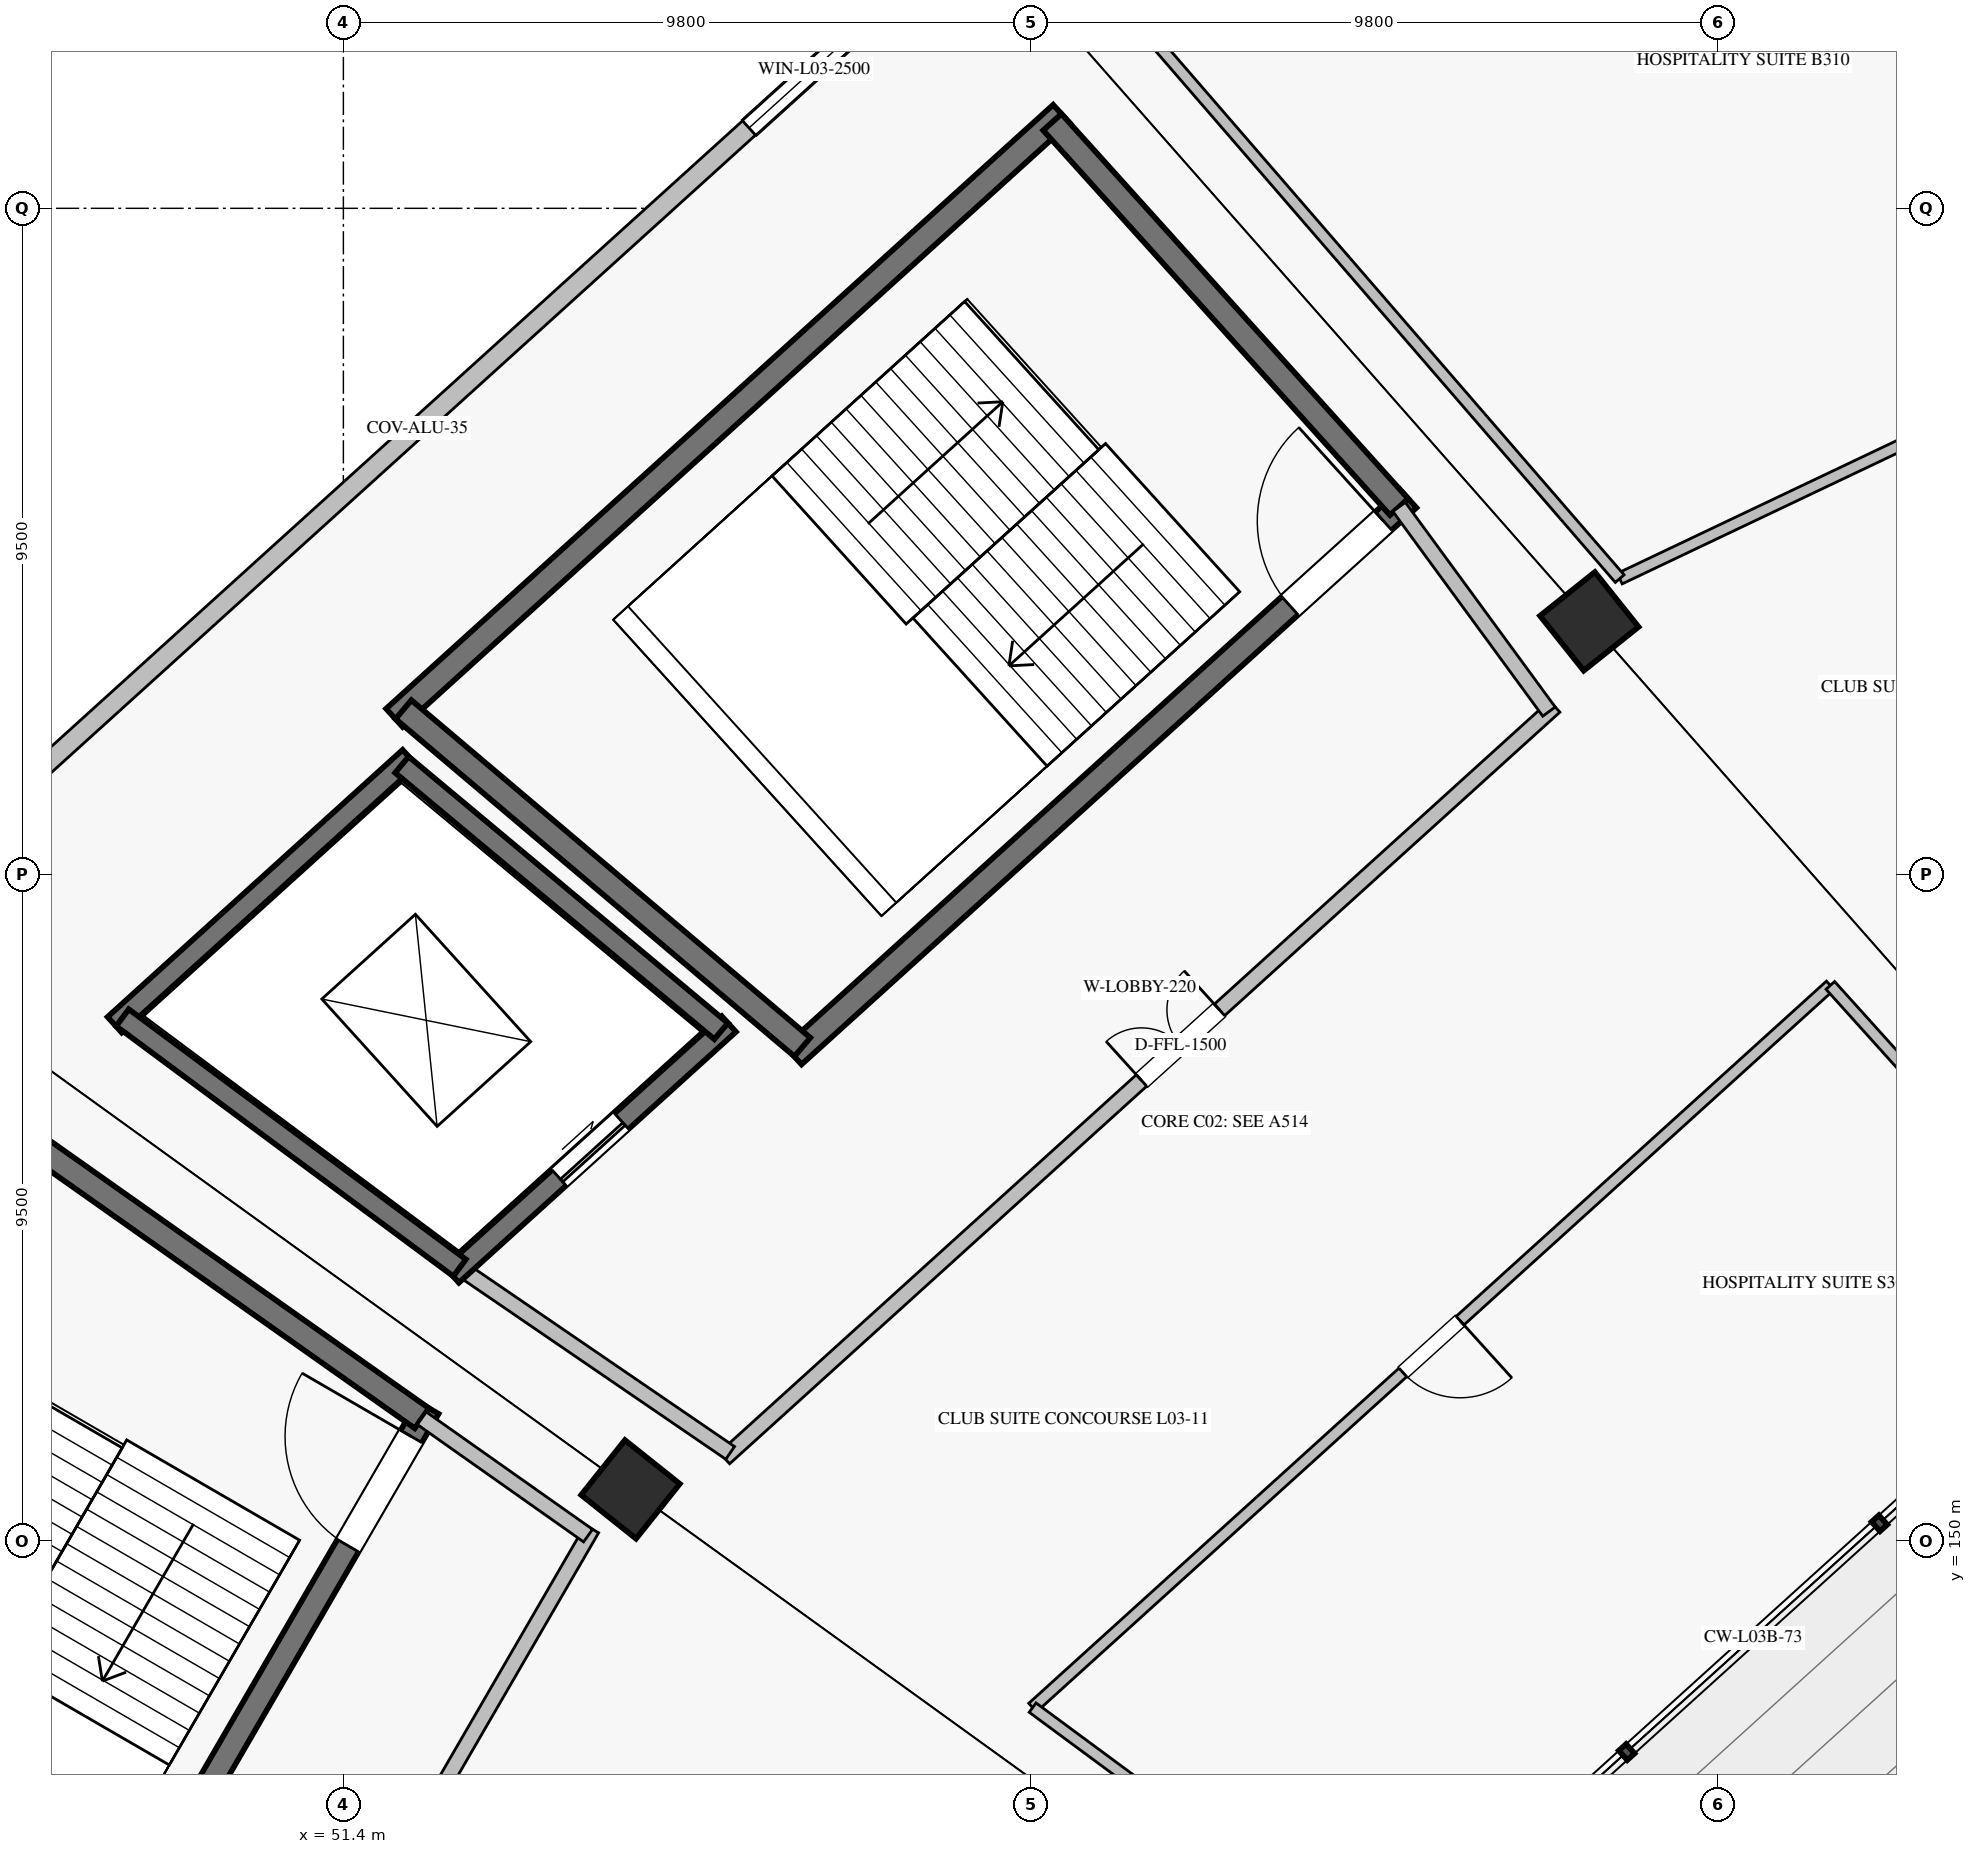
"""IFC4 building model, lengths in metres.
Left out: names, types, materials, properties, quantities, classifications, styles, units other than length and angle.
Written with IfcOpenShell. Run it as: python <this file> out.ifc"""

import sys

from ifc_helpers import new_model, si_unit, direction, frame, frame_2d, origin, origin_2d, place, context, subcontext, project, spatial, rectangle, extrude, element, fill, save


model = new_model("IFC4")
c1 = context("Model", 3, precision=1e-05, world=origin(), true_north=direction((0.0, 1.0)))
c2 = subcontext(c1, "Body", "Model", "MODEL_VIEW")
j1 = project(units=[si_unit("LENGTHUNIT", "METRE"), si_unit("PLANEANGLEUNIT", "RADIAN")], contexts=[c1])
p1 = place(None, origin())
s1 = spatial("IfcSite", under=j1, at=p1, CompositionType="ELEMENT")
p2 = place(p1, origin())
s2 = spatial("IfcBuilding", under=s1, at=p2, CompositionType="ELEMENT")
p3 = place(p2, frame((0.0, 0.0, 15.64)))
s3 = spatial("IfcBuildingStorey", under=s2, at=p3, CompositionType="ELEMENT", Elevation=15.64)
for number, where, z_axis, x_axis in (
    (1, (69.166, 163.111, 0.0), (0.0, 0.0, 1.0), (-0.623, 0.782, 0.0)),
    (2, (55.494, 150.734, 0.0), (0.0, 0.0, 1.0), (-0.782, 0.623, 0.0)),
):
    element("IfcColumn", number, at=place(p3, frame(where, z_axis=z_axis, x_axis=x_axis)), inside=s3, PredefinedType="COLUMN", context=c2, shape_type="SweptSolid", body=[
        extrude(rectangle(XDim=1.0, YDim=1.0, at=origin_2d()), origin(), (0.0, 0.0, 1.0), 4.76),
    ])
p4 = place(p3, frame((60.076, 172.764, 0.0), z_axis=(0.0, 0.0, 1.0), x_axis=(-0.741352367697, -0.671115986183, 0.0)))
e3 = element("IfcWall", 3, at=p4, inside=s3, PredefinedType="SOLIDWALL", context=c2, shape_type="SweptSolid", body=[
    extrude(rectangle(XDim=20.564, YDim=0.275, at=frame_2d((10.282, 0.0))), origin(), (0.0, 0.0, 1.0), 3.81),
])
p5 = place(p4, frame((1.4, 0.0, 1.0)))
e4 = element("IfcOpeningElement", 4, at=p5, cuts=e3, PredefinedType="OPENING", context=c2, shape_type="SweptSolid", body=[
    extrude(rectangle(XDim=2.5, YDim=1.95, at=frame_2d((1.25, 0.975))), frame((0.0, 0.147, 0.0), z_axis=(0.0, -1.0, 0.0), x_axis=(1.0, 0.0, 0.0)), (0.0, 0.0, 1.0), 0.295),
])
p6 = place(p3, frame((66.583, 164.86, 0.0), z_axis=(0.0, 0.0, 1.0), x_axis=(-0.741348929385, -0.671119784315, 0.0)))
e5 = element("IfcWall", 5, at=p6, inside=s3, PredefinedType="SHEAR", context=c2, shape_type="SweptSolid", body=[
    extrude(rectangle(XDim=11.826, YDim=0.35, at=frame_2d((5.913, 0.0))), origin(), (0.0, 0.0, 1.0), 4.46),
])
p7 = place(p6, frame((0.475, 0.0, 0.0)))
e6 = element("IfcOpeningElement", 6, at=p7, cuts=e5, PredefinedType="OPENING", context=c2, shape_type="SweptSolid", body=[
    extrude(rectangle(XDim=1.8, YDim=2.2, at=frame_2d((0.9, 1.1))), frame((0.0, 0.185, 0.0), z_axis=(0.0, -1.0, 0.0), x_axis=(1.0, 0.0, 0.0)), (0.0, 0.0, 1.0), 0.37),
])
p8 = place(p3, frame((61.639, 170.347, 0.0), z_axis=(0.0, 0.0, 1.0), x_axis=(-0.741351373721, -0.671117084183, 0.0)))
e7 = element("IfcWall", 7, at=p8, inside=s3, PredefinedType="SHEAR", context=c2, shape_type="SweptSolid", body=[
    extrude(rectangle(XDim=12.83, YDim=0.35, at=frame_2d((6.415, 0.0))), origin(), (0.0, 0.0, 1.0), 4.46),
])
p9 = place(p3, frame((66.454, 164.743, 0.0), z_axis=(0.0, 0.0, 1.0), x_axis=(-0.669463145673, 0.742845270958, 0.0)))
e8 = element("IfcWall", 8, at=p9, inside=s3, PredefinedType="SHEAR", context=c2, shape_type="SweptSolid", body=[
    extrude(rectangle(XDim=7.386, YDim=0.35, at=frame_2d((3.693, 0.0))), origin(), (0.0, 0.0, 1.0), 4.46),
])
p10 = place(p3, frame((57.945, 157.041, 0.0), z_axis=(0.0, 0.0, 1.0), x_axis=(-0.763422324031, 0.64589964791, 0.0)))
e9 = element("IfcWall", 9, at=p10, inside=s3, PredefinedType="SHEAR", context=c2, shape_type="SweptSolid", body=[
    extrude(rectangle(XDim=7.452, YDim=0.35, at=frame_2d((3.726, 0.0))), origin(), (0.0, 0.0, 1.0), 4.46),
])
p11 = place(p3, frame((56.897, 157.369, 0.0), z_axis=(0.0, 0.0, 1.0), x_axis=(-0.741350155641, -0.671118429736, 0.0)))
e10 = element("IfcWall", 10, at=p11, inside=s3, PredefinedType="SHEAR", context=c2, shape_type="SweptSolid", body=[
    extrude(rectangle(XDim=5.329, YDim=0.3, at=frame_2d((2.665, 0.0))), origin(), (0.0, 0.0, 1.0), 4.46),
])
p12 = place(p11, frame((2.065, 0.0, 0.0)))
e11 = element("IfcOpeningElement", 11, at=p12, cuts=e10, PredefinedType="OPENING", context=c2, shape_type="SweptSolid", body=[
    extrude(rectangle(XDim=1.2, YDim=2.2, at=frame_2d((0.6, 1.1))), frame((0.0, 0.16, 0.0), z_axis=(0.0, -1.0, 0.0), x_axis=(1.0, 0.0, 0.0)), (0.0, 0.0, 1.0), 0.32),
])
p13 = place(p3, frame((52.346, 161.168, 0.0), z_axis=(0.0, 0.0, 1.0), x_axis=(-0.74134208775, -0.671127341815, 0.0)))
e12 = element("IfcWall", 12, at=p13, inside=s3, PredefinedType="SHEAR", context=c2, shape_type="SweptSolid", body=[
    extrude(rectangle(XDim=5.675, YDim=0.3, at=frame_2d((2.837, 0.0))), origin(), (0.0, 0.0, 1.0), 4.46),
])
p14 = place(p3, frame((56.786, 157.268, 0.0), z_axis=(0.0, 0.0, 1.0), x_axis=(-0.767711354146, 0.640795815151, 0.0)))
e13 = element("IfcWall", 13, at=p14, inside=s3, PredefinedType="SHEAR", context=c2, shape_type="SweptSolid", body=[
    extrude(rectangle(XDim=5.929, YDim=0.3, at=frame_2d((2.964, 0.0))), origin(), (0.0, 0.0, 1.0), 4.46),
])
p15 = place(p3, frame((53.058, 153.893, 0.0), z_axis=(0.0, 0.0, 1.0), x_axis=(-0.803101805449, 0.59584183311, 0.0)))
e14 = element("IfcWall", 14, at=p15, inside=s3, PredefinedType="SHEAR", context=c2, shape_type="SweptSolid", body=[
    extrude(rectangle(XDim=5.986, YDim=0.3, at=frame_2d((2.993, 0.0))), origin(), (0.0, 0.0, 1.0), 4.46),
])
p16 = place(p3, frame((68.673, 161.898, 0.0), z_axis=(0.0, 0.0, 1.0), x_axis=(-0.741351035574, -0.671117457717, 0.0)))
e15 = element("IfcWall", 15, at=p16, inside=s3, PredefinedType="SOLIDWALL", context=c2, shape_type="SweptSolid", body=[
    extrude(rectangle(XDim=15.969, YDim=0.22, at=frame_2d((7.985, 0.0))), origin(), (0.0, 0.0, 1.0), 4.46),
])
p17 = place(p16, frame((6.447, 0.0, 0.0)))
e16 = element("IfcOpeningElement", 16, at=p17, cuts=e15, PredefinedType="OPENING", context=c2, shape_type="SweptSolid", body=[
    extrude(rectangle(XDim=1.5, YDim=2.2, at=frame_2d((0.75, 1.1))), frame((0.0, 0.12, 0.0), z_axis=(0.0, -1.0, 0.0), x_axis=(1.0, 0.0, 0.0)), (0.0, 0.0, 1.0), 0.24),
])
p18 = place(p3, frame((68.591, 161.824, 0.0), z_axis=(0.0, 0.0, 1.0), x_axis=(-0.590836915359, 0.806791013491, 0.0)))
e17 = element("IfcWall", 17, at=p18, inside=s3, PredefinedType="SOLIDWALL", context=c2, shape_type="SweptSolid", body=[
    extrude(rectangle(XDim=3.618, YDim=0.22, at=frame_2d((1.809, 0.0))), origin(), (0.0, 0.0, 1.0), 4.46),
])
p19 = place(p3, frame((56.915, 151.254, 0.0), z_axis=(0.0, 0.0, 1.0), x_axis=(-0.825385410642, 0.564569680287, 0.0)))
e18 = element("IfcWall", 18, at=p19, inside=s3, PredefinedType="SOLIDWALL", context=c2, shape_type="SweptSolid", body=[
    extrude(rectangle(XDim=4.674, YDim=0.22, at=frame_2d((2.337, 0.0))), origin(), (0.0, 0.0, 1.0), 4.46),
])
p20 = place(p3, frame((52.606, 151.9, 0.0), z_axis=(0.0, 0.0, 1.0), x_axis=(-0.501587404838, -0.865106973332, 0.0)))
e19 = element("IfcWall", 19, at=p20, inside=s3, PredefinedType="SHEAR", context=c2, shape_type="SweptSolid", body=[
    extrude(rectangle(XDim=11.435, YDim=0.35, at=frame_2d((5.718, 0.0))), origin(), (0.0, 0.0, 1.0), 4.46),
])
p21 = place(p20, frame((0.475, 0.0, 0.0)))
e20 = element("IfcOpeningElement", 20, at=p21, cuts=e19, PredefinedType="OPENING", context=c2, shape_type="SweptSolid", body=[
    extrude(rectangle(XDim=1.8, YDim=2.2, at=frame_2d((0.9, 1.1))), frame((0.0, 0.185, 0.0), z_axis=(0.0, -1.0, 0.0), x_axis=(1.0, 0.0, 0.0)), (0.0, 0.0, 1.0), 0.37),
])
p22 = place(p3, frame((52.519, 151.748, 0.0), z_axis=(0.0, 0.0, 1.0), x_axis=(-0.816983109824, 0.576661597701, 0.0)))
e21 = element("IfcWall", 21, at=p22, inside=s3, PredefinedType="SHEAR", context=c2, shape_type="SweptSolid", body=[
    extrude(rectangle(XDim=7.544, YDim=0.35, at=frame_2d((3.772, 0.0))), origin(), (0.0, 0.0, 1.0), 4.46),
])
p23 = place(p3, frame((54.944, 150.17, 0.0), z_axis=(0.0, 0.0, 1.0), x_axis=(-0.501612626242, -0.865092349518, 0.0)))
e22 = element("IfcWall", 22, at=p23, inside=s3, PredefinedType="SOLIDWALL", context=c2, shape_type="SweptSolid", body=[
    extrude(rectangle(XDim=16.11, YDim=0.22, at=frame_2d((8.055, 0.0))), origin(), (0.0, 0.0, 1.0), 4.46),
])
p24 = place(p23, frame((6.511, 0.0, 0.0)))
e23 = element("IfcOpeningElement", 23, at=p24, cuts=e22, PredefinedType="OPENING", context=c2, shape_type="SweptSolid", body=[
    extrude(rectangle(XDim=1.5, YDim=2.2, at=frame_2d((0.75, 1.1))), frame((0.0, 0.12, 0.0), z_axis=(0.0, -1.0, 0.0), x_axis=(1.0, 0.0, 0.0)), (0.0, 0.0, 1.0), 0.24),
])
p25 = place(p3, frame((54.889, 150.075, 0.0), z_axis=(0.0, 0.0, 1.0), x_axis=(-0.816984187086, 0.57666007149, 0.0)))
e24 = element("IfcWall", 24, at=p25, inside=s3, PredefinedType="SOLIDWALL", context=c2, shape_type="SweptSolid", body=[
    extrude(rectangle(XDim=2.901, YDim=0.22, at=frame_2d((1.451, 0.0))), origin(), (0.0, 0.0, 1.0), 4.46),
])
p26 = place(p3, frame((85.333, 171.196, 0.0), z_axis=(0.0, 0.0, 1.0), x_axis=(-0.903217202186, -0.429183743488, 0.0)))
e25 = element("IfcWall", 25, at=p26, inside=s3, PredefinedType="PARTITIONING", context=c2, shape_type="SweptSolid", body=[
    extrude(rectangle(XDim=17.419, YDim=0.165, at=frame_2d((8.709, 0.0))), origin(), (0.0, 0.0, 1.0), 3.78),
])
p27 = place(p26, frame((7.91, 0.0, 0.0)))
e26 = element("IfcOpeningElement", 26, at=p27, cuts=e25, PredefinedType="OPENING", context=c2, shape_type="SweptSolid", body=[
    extrude(rectangle(XDim=1.6, YDim=2.3, at=frame_2d((0.8, 1.15))), frame((0.0, 0.093, 0.0), z_axis=(0.0, -1.0, 0.0), x_axis=(1.0, 0.0, 0.0)), (0.0, 0.0, 1.0), 0.185),
])
p28 = place(p3, frame((69.599, 163.72, 0.0), z_axis=(0.0, 0.0, 1.0), x_axis=(-0.654293035882, 0.756241114458, 0.0)))
e27 = element("IfcWall", 27, at=p28, inside=s3, PredefinedType="PARTITIONING", context=c2, shape_type="SweptSolid", body=[
    extrude(rectangle(XDim=12.091, YDim=0.165, at=frame_2d((6.045, 0.0))), origin(), (0.0, 0.0, 1.0), 3.78),
])
p29 = place(p3, frame((72.603, 157.92, 0.0), z_axis=(0.0, 0.0, 1.0), x_axis=(-0.741351792112, -0.671116622006, 0.0)))
e28 = element("IfcWall", 28, at=p29, inside=s3, PredefinedType="PARTITIONING", context=c2, shape_type="SweptSolid", body=[
    extrude(rectangle(XDim=15.343, YDim=0.165, at=frame_2d((7.672, 0.0))), origin(), (0.0, 0.0, 1.0), 3.78),
])
p30 = place(p29, frame((7.122, 0.0, 0.0)))
e29 = element("IfcOpeningElement", 29, at=p30, cuts=e28, PredefinedType="OPENING", context=c2, shape_type="SweptSolid", body=[
    extrude(rectangle(XDim=1.1, YDim=2.25, at=frame_2d((0.55, 1.125))), frame((0.0, 0.093, 0.0), z_axis=(0.0, -1.0, 0.0), x_axis=(1.0, 0.0, 0.0)), (0.0, 0.0, 1.0), 0.185),
])
p31 = place(p3, frame((72.603, 157.92, 0.0), z_axis=(0.0, 0.0, 1.0), x_axis=(0.669466645314, -0.742842117015, 0.0)))
e30 = element("IfcWall", 30, at=p31, inside=s3, PredefinedType="PARTITIONING", context=c2, shape_type="SweptSolid", body=[
    extrude(rectangle(XDim=5.776, YDim=0.165, at=frame_2d((2.888, 0.0))), origin(), (0.0, 0.0, 1.0), 3.78),
])
p32 = place(p3, frame((61.228, 147.623, 0.0), z_axis=(0.0, 0.0, 1.0), x_axis=(0.804403413526, -0.594083452309, 0.0)))
e31 = element("IfcWall", 31, at=p32, inside=s3, PredefinedType="PARTITIONING", context=c2, shape_type="SweptSolid", body=[
    extrude(rectangle(XDim=5.892, YDim=0.165, at=frame_2d((2.946, 0.0))), origin(), (0.0, 0.0, 1.0), 3.78),
])
p33 = place(p5, origin())
e32 = element("IfcWindow", 32, at=p33, inside=s3, PartitioningType="SINGLE_PANEL", PredefinedType="WINDOW", context=c2, shape_type="SweptSolid", body=[
    extrude(rectangle(XDim=2.5, YDim=1.95, at=frame_2d((1.25, 0.975))), frame((0.0, 0.03, 0.0), z_axis=(0.0, -1.0, 0.0), x_axis=(1.0, 0.0, 0.0)), (0.0, 0.0, 1.0), 0.06),
])
fill(e4, e32)
p34 = place(p7, frame((1.8, 0.0, 0.0), z_axis=(0.0, 0.0, 1.0), x_axis=(-1.0, 0.0, 0.0)))
e33 = element("IfcDoor", 33, at=p34, inside=s3, OperationType="SINGLE_SWING_RIGHT", PredefinedType="DOOR", context=c2, shape_type="SweptSolid", body=[
    extrude(rectangle(XDim=1.8, YDim=2.2, at=frame_2d((0.9, 1.1))), frame((0.0, 0.025, 0.0), z_axis=(0.0, -1.0, 0.0), x_axis=(1.0, 0.0, 0.0)), (0.0, 0.0, 1.0), 0.05),
])
fill(e6, e33)
p35 = place(p12, origin())
e34 = element("IfcDoor", 34, at=p35, inside=s3, OperationType="SLIDING_TO_LEFT", PredefinedType="DOOR", context=c2, shape_type="SweptSolid", body=[
    extrude(rectangle(XDim=1.2, YDim=2.2, at=frame_2d((0.6, 1.1))), frame((0.0, 0.025, 0.0), z_axis=(0.0, -1.0, 0.0), x_axis=(1.0, 0.0, 0.0)), (0.0, 0.0, 1.0), 0.05),
])
fill(e11, e34)
p36 = place(p17, frame((1.5, 0.0, 0.0), z_axis=(0.0, 0.0, 1.0), x_axis=(-1.0, 0.0, 0.0)))
e35 = element("IfcDoor", 35, at=p36, inside=s3, OperationType="DOUBLE_DOOR_SINGLE_SWING", PredefinedType="DOOR", context=c2, shape_type="SweptSolid", body=[
    extrude(rectangle(XDim=1.5, YDim=2.2, at=frame_2d((0.75, 1.1))), frame((0.0, 0.025, 0.0), z_axis=(0.0, -1.0, 0.0), x_axis=(1.0, 0.0, 0.0)), (0.0, 0.0, 1.0), 0.05),
])
fill(e16, e35)
p37 = place(p21, frame((1.8, 0.0, 0.0), z_axis=(0.0, 0.0, 1.0), x_axis=(-1.0, 0.0, 0.0)))
e36 = element("IfcDoor", 36, at=p37, inside=s3, OperationType="SINGLE_SWING_RIGHT", PredefinedType="DOOR", context=c2, shape_type="SweptSolid", body=[
    extrude(rectangle(XDim=1.8, YDim=2.2, at=frame_2d((0.9, 1.1))), frame((0.0, 0.025, 0.0), z_axis=(0.0, -1.0, 0.0), x_axis=(1.0, 0.0, 0.0)), (0.0, 0.0, 1.0), 0.05),
])
fill(e20, e36)
p38 = place(p30, origin())
e37 = element("IfcDoor", 37, at=p38, inside=s3, OperationType="SINGLE_SWING_LEFT", PredefinedType="DOOR", context=c2, shape_type="SweptSolid", body=[
    extrude(rectangle(XDim=1.1, YDim=2.25, at=frame_2d((0.55, 1.125))), frame((0.0, 0.025, 0.0), z_axis=(0.0, -1.0, 0.0), x_axis=(1.0, 0.0, 0.0)), (0.0, 0.0, 1.0), 0.05),
])
fill(e29, e37)
save(model, sys.argv[1])
